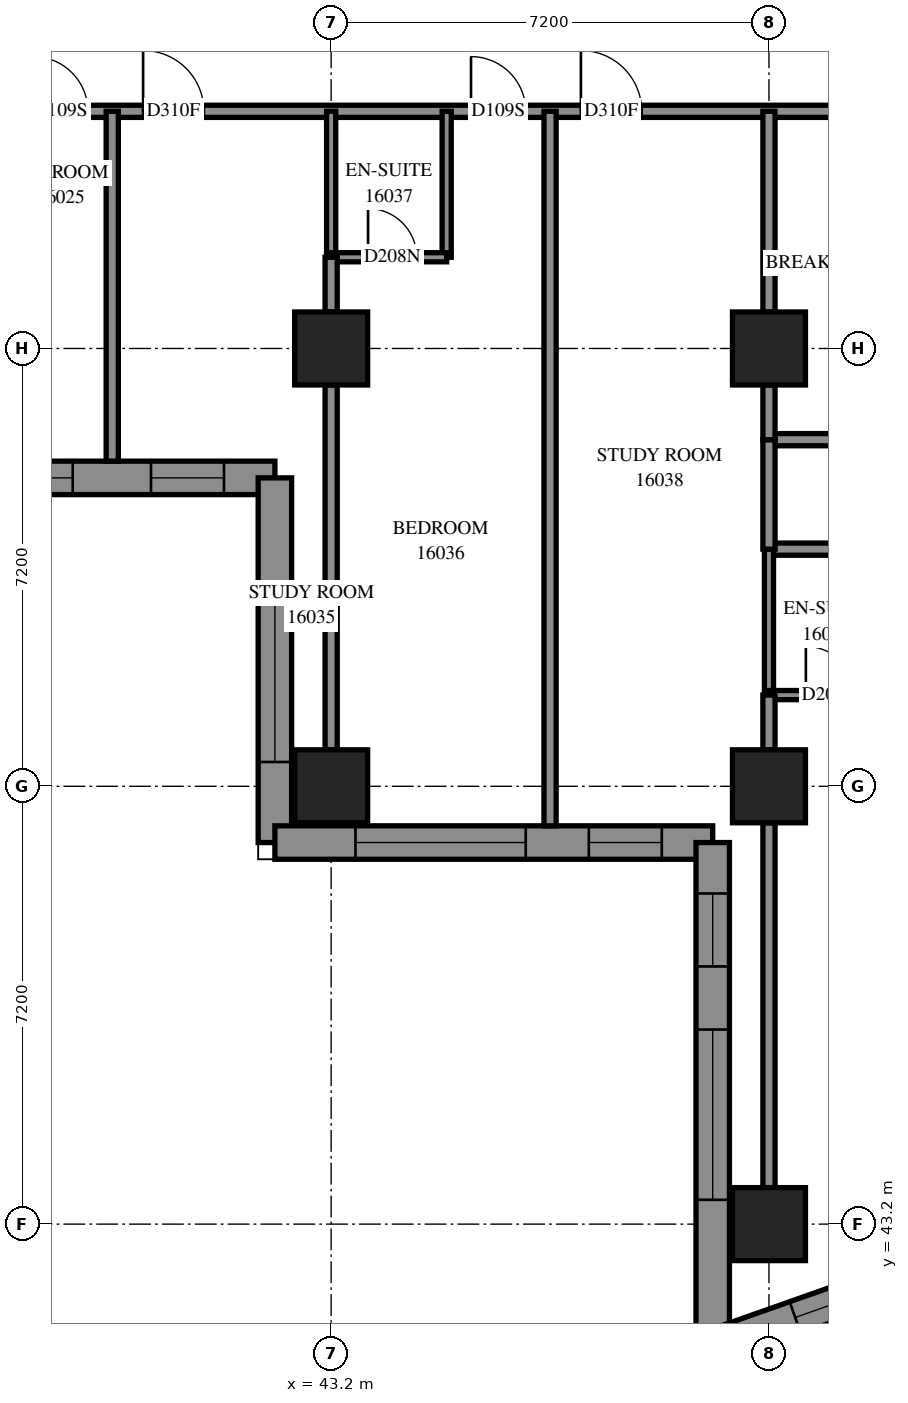
"""IFC4 building model, lengths in metres.
Left out: names, types, materials, properties, quantities, classifications, styles, units other than length and angle.
Written with IfcOpenShell. Run it as: python <this file> out.ifc"""

import sys

from ifc_helpers import new_model, si_unit, direction, frame, frame_2d, origin, origin_2d, place, context, subcontext, project, spatial, polyline, rectangle, outline, extrude, element, fill, save


model = new_model("IFC4")
c1 = context("Model", 3, precision=1e-05, world=origin(), true_north=direction((0.0, 1.0)))
c2 = subcontext(c1, "Body", "Model", "MODEL_VIEW")
j1 = project(units=[si_unit("LENGTHUNIT", "METRE"), si_unit("PLANEANGLEUNIT", "RADIAN")], contexts=[c1])
p1 = place(None, origin())
s1 = spatial("IfcSite", under=j1, at=p1, CompositionType="ELEMENT")
p2 = place(p1, origin())
s2 = spatial("IfcBuilding", under=s1, at=p2, CompositionType="ELEMENT")
p3 = place(p2, frame((0.0, 0.0, 61.0)))
s3 = spatial("IfcBuildingStorey", under=s2, at=p3, CompositionType="ELEMENT", Elevation=61.0)
for number, where, z_axis, x_axis in (
    (1, (43.2, 50.4, 0.0), (0.0, 0.0, 1.0), (1.0, 0.0, 0.0)),
    (2, (43.2, 57.6, 0.0), (0.0, 0.0, 1.0), (1.0, 0.0, 0.0)),
    (3, (50.4, 43.2, 0.0), (0.0, 0.0, 1.0), (1.0, 0.0, 0.0)),
    (4, (50.4, 50.4, 0.0), (0.0, 0.0, 1.0), (1.0, 0.0, 0.0)),
    (5, (50.4, 57.6, 0.0), (0.0, 0.0, 1.0), (1.0, 0.0, 0.0)),
):
    element("IfcColumn", number, at=place(p3, frame(where, z_axis=z_axis, x_axis=x_axis)), inside=s3, PredefinedType="COLUMN", context=c2, shape_type="SweptSolid", body=[
        extrude(rectangle(XDim=1.2, YDim=1.2, at=origin_2d()), origin(), (0.0, 0.0, 1.0), 3.1),
    ])
p4 = place(p3, frame((27.875, 55.472, 0.0), z_axis=(0.0, 0.0, 1.0), x_axis=(1.0, 0.0, 0.0)))
e6 = element("IfcWall", 6, at=p4, inside=s3, PredefinedType="SOLIDWALL", context=c2, shape_type="SweptSolid", body=[
    extrude(outline(polyline([(-0.275, -0.275), (14.125, -0.275), (14.675, 0.275), (0.275, 0.275), (-0.275, -0.275)])), origin(), (0.0, 0.0, 1.0), 3.1),
])
p5 = place(p4, frame((1.325, 0.0, 0.5)))
e7 = element("IfcOpeningElement", 7, at=p5, cuts=e6, PredefinedType="OPENING", context=c2, shape_type="SweptSolid", body=[
    extrude(rectangle(XDim=2.8, YDim=2.45, at=frame_2d((1.4, 1.225))), frame((0.0, 0.285, 0.0), z_axis=(0.0, -1.0, 0.0), x_axis=(1.0, 0.0, 0.0)), (0.0, 0.0, 1.0), 0.57),
])
p6 = place(p4, frame((4.925, 0.0, 0.5)))
e8 = element("IfcOpeningElement", 8, at=p6, cuts=e6, PredefinedType="OPENING", context=c2, shape_type="SweptSolid", body=[
    extrude(rectangle(XDim=2.8, YDim=2.45, at=frame_2d((1.4, 1.225))), frame((0.0, 0.285, 0.0), z_axis=(0.0, -1.0, 0.0), x_axis=(1.0, 0.0, 0.0)), (0.0, 0.0, 1.0), 0.57),
])
p7 = place(p4, frame((8.275, 0.0, 0.5)))
e9 = element("IfcOpeningElement", 9, at=p7, cuts=e6, PredefinedType="OPENING", context=c2, shape_type="SweptSolid", body=[
    extrude(rectangle(XDim=2.8, YDim=2.45, at=frame_2d((1.4, 1.225))), frame((0.0, 0.285, 0.0), z_axis=(0.0, -1.0, 0.0), x_axis=(1.0, 0.0, 0.0)), (0.0, 0.0, 1.0), 0.57),
])
p8 = place(p4, frame((12.363, 0.0, 0.5)))
e10 = element("IfcOpeningElement", 10, at=p8, cuts=e6, PredefinedType="OPENING", context=c2, shape_type="SweptSolid", body=[
    extrude(rectangle(XDim=1.2, YDim=2.45, at=frame_2d((0.6, 1.225))), frame((0.0, 0.285, 0.0), z_axis=(0.0, -1.0, 0.0), x_axis=(1.0, 0.0, 0.0)), (0.0, 0.0, 1.0), 0.57),
])
p9 = place(p3, frame((42.275, 55.472, 0.0), z_axis=(0.0, 0.0, 1.0), x_axis=(0.0, -1.0, 0.0)))
e11 = element("IfcWall", 11, at=p9, inside=s3, PredefinedType="SOLIDWALL", context=c2, shape_type="SweptSolid", body=[
    extrude(outline(polyline([(0.275, -0.275), (6.272, -0.275), (5.722, 0.275), (-0.275, 0.275), (0.275, -0.275)])), origin(), (0.0, 0.0, 1.0), 3.1),
])
p10 = place(p9, frame((1.872, 0.0, 0.5)))
e12 = element("IfcOpeningElement", 12, at=p10, cuts=e11, PredefinedType="OPENING", context=c2, shape_type="SweptSolid", body=[
    extrude(rectangle(XDim=2.8, YDim=2.45, at=frame_2d((1.4, 1.225))), frame((0.0, 0.285, 0.0), z_axis=(0.0, -1.0, 0.0), x_axis=(1.0, 0.0, 0.0)), (0.0, 0.0, 1.0), 0.57),
])
p11 = place(p3, frame((42.275, 49.475, 0.0), z_axis=(0.0, 0.0, 1.0), x_axis=(1.0, 0.0, 0.0)))
e13 = element("IfcWall", 13, at=p11, inside=s3, PredefinedType="SOLIDWALL", context=c2, shape_type="SweptSolid", body=[
    extrude(outline(polyline([(-0.275, -0.275), (6.925, -0.275), (7.475, 0.275), (0.275, 0.275), (-0.275, -0.275)])), origin(), (0.0, 0.0, 1.0), 3.1),
])
p12 = place(p11, frame((1.325, 0.0, 0.5)))
e14 = element("IfcOpeningElement", 14, at=p12, cuts=e13, PredefinedType="OPENING", context=c2, shape_type="SweptSolid", body=[
    extrude(rectangle(XDim=2.8, YDim=2.45, at=frame_2d((1.4, 1.225))), frame((0.0, 0.285, 0.0), z_axis=(0.0, -1.0, 0.0), x_axis=(1.0, 0.0, 0.0)), (0.0, 0.0, 1.0), 0.57),
])
p13 = place(p11, frame((5.162, 0.0, 0.5)))
e15 = element("IfcOpeningElement", 15, at=p13, cuts=e13, PredefinedType="OPENING", context=c2, shape_type="SweptSolid", body=[
    extrude(rectangle(XDim=1.2, YDim=2.45, at=frame_2d((0.6, 1.225))), frame((0.0, 0.285, 0.0), z_axis=(0.0, -1.0, 0.0), x_axis=(1.0, 0.0, 0.0)), (0.0, 0.0, 1.0), 0.57),
])
p14 = place(p3, frame((49.475, 49.475, 0.0), z_axis=(0.0, 0.0, 1.0), x_axis=(0.0, -1.0, 0.0)))
e16 = element("IfcWall", 16, at=p14, inside=s3, PredefinedType="SOLIDWALL", context=c2, shape_type="SweptSolid", body=[
    extrude(outline(polyline([(0.275, -0.275), (8.678, -0.275), (7.901, 0.275), (-0.275, 0.275), (0.275, -0.275)])), origin(), (0.0, 0.0, 1.0), 3.1),
])
p15 = place(p14, frame((3.075, 0.0, 0.5)))
e17 = element("IfcOpeningElement", 17, at=p15, cuts=e16, PredefinedType="OPENING", context=c2, shape_type="SweptSolid", body=[
    extrude(rectangle(XDim=2.8, YDim=2.45, at=frame_2d((1.4, 1.225))), frame((0.0, 0.285, 0.0), z_axis=(0.0, -1.0, 0.0), x_axis=(1.0, 0.0, 0.0)), (0.0, 0.0, 1.0), 0.57),
])
p16 = place(p14, frame((0.838, 0.0, 0.5)))
e18 = element("IfcOpeningElement", 18, at=p16, cuts=e16, PredefinedType="OPENING", context=c2, shape_type="SweptSolid", body=[
    extrude(rectangle(XDim=1.2, YDim=2.45, at=frame_2d((0.6, 1.225))), frame((0.0, 0.285, 0.0), z_axis=(0.0, -1.0, 0.0), x_axis=(1.0, 0.0, 0.0)), (0.0, 0.0, 1.0), 0.57),
])
p17 = place(p3, frame((49.475, 41.186, 0.0), z_axis=(0.0, 0.0, 1.0), x_axis=(0.9429483298, 0.3329391044, 0.0)))
e19 = element("IfcWall", 19, at=p17, inside=s3, PredefinedType="SOLIDWALL", context=c2, shape_type="SweptSolid", body=[
    extrude(outline(polyline([(-0.389, -0.275), (3.225, -0.275), (3.369, 0.275), (0.389, 0.275), (-0.389, -0.275)])), origin(), (0.0, 0.0, 1.0), 3.1),
])
p18 = place(p17, frame((1.439, 0.0, 0.5)))
e20 = element("IfcOpeningElement", 20, at=p18, cuts=e19, PredefinedType="OPENING", context=c2, shape_type="SweptSolid", body=[
    extrude(rectangle(XDim=1.2, YDim=2.45, at=frame_2d((0.6, 1.225))), frame((0.0, 0.285, 0.0), z_axis=(0.0, -1.0, 0.0), x_axis=(1.0, 0.0, 0.0)), (0.0, 0.0, 1.0), 0.57),
])
p19 = place(p3, frame((28.8, 61.5, 0.0), z_axis=(0.0, 0.0, 1.0), x_axis=(1.0, 0.0, 0.0)))
e21 = element("IfcWall", 21, at=p19, inside=s3, PredefinedType="PARTITIONING", context=c2, shape_type="SweptSolid", body=[
    extrude(rectangle(XDim=24.3, YDim=0.2, at=frame_2d((12.15, 0.0))), origin(), (0.0, 0.0, 1.0), 3.1),
])
p20 = place(p19, frame((3.899, 0.0, 0.0)))
e22 = element("IfcOpeningElement", 22, at=p20, cuts=e21, PredefinedType="OPENING", context=c2, shape_type="SweptSolid", body=[
    extrude(rectangle(XDim=0.9, YDim=2.1, at=frame_2d((0.45, 1.05))), frame((0.0, 0.11, 0.0), z_axis=(0.0, -1.0, 0.0), x_axis=(1.0, 0.0, 0.0)), (0.0, 0.0, 1.0), 0.22),
])
p21 = place(p19, frame((9.5, 0.0, 0.0)))
e23 = element("IfcOpeningElement", 23, at=p21, cuts=e21, PredefinedType="OPENING", context=c2, shape_type="SweptSolid", body=[
    extrude(rectangle(XDim=0.9, YDim=2.1, at=frame_2d((0.45, 1.05))), frame((0.0, 0.11, 0.0), z_axis=(0.0, -1.0, 0.0), x_axis=(1.0, 0.0, 0.0)), (0.0, 0.0, 1.0), 0.22),
])
p22 = place(p19, frame((11.307, 0.0, 0.0)))
e24 = element("IfcOpeningElement", 24, at=p22, cuts=e21, PredefinedType="OPENING", context=c2, shape_type="SweptSolid", body=[
    extrude(rectangle(XDim=1.0, YDim=2.1, at=frame_2d((0.5, 1.05))), frame((0.0, 0.11, 0.0), z_axis=(0.0, -1.0, 0.0), x_axis=(1.0, 0.0, 0.0)), (0.0, 0.0, 1.0), 0.22),
])
p23 = place(p19, frame((16.7, 0.0, 0.0)))
e25 = element("IfcOpeningElement", 25, at=p23, cuts=e21, PredefinedType="OPENING", context=c2, shape_type="SweptSolid", body=[
    extrude(rectangle(XDim=0.9, YDim=2.1, at=frame_2d((0.45, 1.05))), frame((0.0, 0.11, 0.0), z_axis=(0.0, -1.0, 0.0), x_axis=(1.0, 0.0, 0.0)), (0.0, 0.0, 1.0), 0.22),
])
p24 = place(p19, frame((18.508, 0.0, 0.0)))
e26 = element("IfcOpeningElement", 26, at=p24, cuts=e21, PredefinedType="OPENING", context=c2, shape_type="SweptSolid", body=[
    extrude(rectangle(XDim=1.0, YDim=2.1, at=frame_2d((0.5, 1.05))), frame((0.0, 0.11, 0.0), z_axis=(0.0, -1.0, 0.0), x_axis=(1.0, 0.0, 0.0)), (0.0, 0.0, 1.0), 0.22),
])
p25 = place(p19, frame((23.033, 0.0, 0.0)))
e27 = element("IfcOpeningElement", 27, at=p25, cuts=e21, PredefinedType="OPENING", context=c2, shape_type="SweptSolid", body=[
    extrude(rectangle(XDim=1.0, YDim=2.1, at=frame_2d((0.5, 1.05))), frame((0.0, 0.11, 0.0), z_axis=(0.0, -1.0, 0.0), x_axis=(1.0, 0.0, 0.0)), (0.0, 0.0, 1.0), 0.22),
])
p26 = place(p3, frame((46.8, 49.75, 0.0), z_axis=(0.0, 0.0, 1.0), x_axis=(0.0, 1.0, 0.0)))
e28 = element("IfcWall", 28, at=p26, inside=s3, PredefinedType="PARTITIONING", context=c2, shape_type="SweptSolid", body=[
    extrude(rectangle(XDim=11.75, YDim=0.2, at=frame_2d((5.875, 0.0))), origin(), (0.0, 0.0, 1.0), 3.1),
])
for number, where, z_axis, x_axis in (
    (29, (43.2, 51.0, 0.0), (0.0, 0.0, 1.0), (0.0, 1.0, 0.0)),
    (30, (50.4, 43.8, 0.0), (0.0, 0.0, 1.0), (0.0, 1.0, 0.0)),
):
    element("IfcWall", number, at=place(p3, frame(where, z_axis=z_axis, x_axis=x_axis)), inside=s3, PredefinedType="PARTITIONING", context=c2, shape_type="SweptSolid", body=[
        extrude(rectangle(XDim=6.0, YDim=0.2, at=frame_2d((3.0, 0.0))), origin(), (0.0, 0.0, 1.0), 2.6),
    ])
p27 = place(p3, frame((39.6, 55.747, 0.0), z_axis=(0.0, 0.0, 1.0), x_axis=(0.0, 1.0, 0.0)))
e31 = element("IfcWall", 31, at=p27, inside=s3, PredefinedType="PARTITIONING", context=c2, shape_type="SweptSolid", body=[
    extrude(rectangle(XDim=5.753, YDim=0.2, at=frame_2d((2.877, 0.0))), origin(), (0.0, 0.0, 1.0), 3.1),
])
p28 = place(p3, frame((50.4, 54.3, 0.0), z_axis=(0.0, 0.0, 1.0), x_axis=(1.0, 0.0, 0.0)))
e32 = element("IfcWall", 32, at=p28, inside=s3, PredefinedType="PARTITIONING", context=c2, shape_type="SweptSolid", body=[
    extrude(rectangle(XDim=4.7, YDim=0.2, at=frame_2d((2.35, 0.0))), origin(), (0.0, 0.0, 1.0), 3.1),
])
p29 = place(p28, frame((2.3, 0.0, 0.0)))
e33 = element("IfcOpeningElement", 33, at=p29, cuts=e32, PredefinedType="OPENING", context=c2, shape_type="SweptSolid", body=[
    extrude(rectangle(XDim=0.9, YDim=2.1, at=frame_2d((0.45, 1.05))), frame((0.0, 0.11, 0.0), z_axis=(0.0, -1.0, 0.0), x_axis=(1.0, 0.0, 0.0)), (0.0, 0.0, 1.0), 0.22),
])
p30 = place(p3, frame((50.4, 58.2, 0.0), z_axis=(0.0, 0.0, 1.0), x_axis=(0.0, 1.0, 0.0)))
e34 = element("IfcWall", 34, at=p30, inside=s3, PredefinedType="PARTITIONING", context=c2, shape_type="SweptSolid", body=[
    extrude(rectangle(XDim=3.3, YDim=0.2, at=frame_2d((1.65, 0.0))), origin(), (0.0, 0.0, 1.0), 3.1),
])
p31 = place(p3, frame((50.4, 56.1, 0.0), z_axis=(0.0, 0.0, 1.0), x_axis=(1.0, 0.0, 0.0)))
e35 = element("IfcWall", 35, at=p31, inside=s3, PredefinedType="PARTITIONING", context=c2, shape_type="SweptSolid", body=[
    extrude(rectangle(XDim=2.7, YDim=0.2, at=frame_2d((1.35, 0.0))), origin(), (0.0, 0.0, 1.0), 3.1),
])
for number, where, z_axis, x_axis in (
    (36, (45.1, 59.1, 0.0), (0.0, 0.0, 1.0), (0.0, 1.0, 0.0)),
    (37, (43.2, 59.1, 0.0), (0.0, 0.0, 1.0), (0.0, 1.0, 0.0)),
    (38, (50.4, 51.9, 0.0), (0.0, 0.0, 1.0), (0.0, 1.0, 0.0)),
):
    element("IfcWall", number, at=place(p3, frame(where, z_axis=z_axis, x_axis=x_axis)), inside=s3, PredefinedType="PARTITIONING", context=c2, shape_type="SweptSolid", body=[
        extrude(rectangle(XDim=2.4, YDim=0.15, at=frame_2d((1.2, 0.0))), origin(), (0.0, 0.0, 1.0), 3.1),
    ])
p32 = place(p3, frame((43.2, 59.1, 0.0), z_axis=(0.0, 0.0, 1.0), x_axis=(1.0, 0.0, 0.0)))
e39 = element("IfcWall", 39, at=p32, inside=s3, PredefinedType="PARTITIONING", context=c2, shape_type="SweptSolid", body=[
    extrude(rectangle(XDim=1.9, YDim=0.15, at=frame_2d((0.95, 0.0))), origin(), (0.0, 0.0, 1.0), 3.1),
])
p33 = place(p32, frame((0.607, 0.0, 0.0)))
e40 = element("IfcOpeningElement", 40, at=p33, cuts=e39, PredefinedType="OPENING", context=c2, shape_type="SweptSolid", body=[
    extrude(rectangle(XDim=0.8, YDim=2.1, at=frame_2d((0.4, 1.05))), frame((0.0, 0.085, 0.0), z_axis=(0.0, -1.0, 0.0), x_axis=(1.0, 0.0, 0.0)), (0.0, 0.0, 1.0), 0.17),
])
p34 = place(p3, frame((50.4, 51.9, 0.0), z_axis=(0.0, 0.0, 1.0), x_axis=(1.0, 0.0, 0.0)))
e41 = element("IfcWall", 41, at=p34, inside=s3, PredefinedType="PARTITIONING", context=c2, shape_type="SweptSolid", body=[
    extrude(rectangle(XDim=1.9, YDim=0.15, at=frame_2d((0.95, 0.0))), origin(), (0.0, 0.0, 1.0), 3.1),
])
p35 = place(p34, frame((0.607, 0.0, 0.0)))
e42 = element("IfcOpeningElement", 42, at=p35, cuts=e41, PredefinedType="OPENING", context=c2, shape_type="SweptSolid", body=[
    extrude(rectangle(XDim=0.8, YDim=2.1, at=frame_2d((0.4, 1.05))), frame((0.0, 0.085, 0.0), z_axis=(0.0, -1.0, 0.0), x_axis=(1.0, 0.0, 0.0)), (0.0, 0.0, 1.0), 0.17),
])
p36 = place(p3, frame((50.4, 54.3, 0.0), z_axis=(0.0, 0.0, 1.0), x_axis=(0.0, 1.0, 0.0)))
e43 = element("IfcWall", 43, at=p36, inside=s3, PredefinedType="PARTITIONING", context=c2, shape_type="SweptSolid", body=[
    extrude(rectangle(XDim=1.8, YDim=0.2, at=frame_2d((0.9, 0.0))), origin(), (0.0, 0.0, 1.0), 3.1),
])
for number, where, z_axis, x_axis in (
    (44, (43.2, 58.2, 0.0), (0.0, 0.0, 1.0), (0.0, 1.0, 0.0)),
    (45, (50.4, 51.0, 0.0), (0.0, 0.0, 1.0), (0.0, 1.0, 0.0)),
    (46, (50.4, 56.1, 0.0), (0.0, 0.0, 1.0), (0.0, 1.0, 0.0)),
):
    element("IfcWall", number, at=place(p3, frame(where, z_axis=z_axis, x_axis=x_axis)), inside=s3, PredefinedType="PARTITIONING", context=c2, shape_type="SweptSolid", body=[
        extrude(rectangle(XDim=0.9, YDim=0.2, at=frame_2d((0.45, 0.0))), origin(), (0.0, 0.0, 1.0), 3.1),
    ])
p37 = place(p7, origin())
e47 = element("IfcWindow", 47, at=p37, inside=s3, PartitioningType="SINGLE_PANEL", PredefinedType="WINDOW", context=c2, shape_type="SweptSolid", body=[
    extrude(rectangle(XDim=2.8, YDim=2.45, at=frame_2d((1.4, 1.225))), frame((0.0, 0.155, 0.0), z_axis=(0.0, -1.0, 0.0), x_axis=(1.0, 0.0, 0.0)), (0.0, 0.0, 1.0), 0.06),
])
fill(e9, e47)
p38 = place(p8, origin())
e48 = element("IfcWindow", 48, at=p38, inside=s3, PartitioningType="SINGLE_PANEL", PredefinedType="WINDOW", context=c2, shape_type="SweptSolid", body=[
    extrude(rectangle(XDim=1.2, YDim=2.45, at=frame_2d((0.6, 1.225))), frame((0.0, 0.155, 0.0), z_axis=(0.0, -1.0, 0.0), x_axis=(1.0, 0.0, 0.0)), (0.0, 0.0, 1.0), 0.06),
])
fill(e10, e48)
p39 = place(p10, origin())
e49 = element("IfcWindow", 49, at=p39, inside=s3, PartitioningType="SINGLE_PANEL", PredefinedType="WINDOW", context=c2, shape_type="SweptSolid", body=[
    extrude(rectangle(XDim=2.8, YDim=2.45, at=frame_2d((1.4, 1.225))), frame((0.0, 0.155, 0.0), z_axis=(0.0, -1.0, 0.0), x_axis=(1.0, 0.0, 0.0)), (0.0, 0.0, 1.0), 0.06),
])
fill(e12, e49)
p40 = place(p12, origin())
e50 = element("IfcWindow", 50, at=p40, inside=s3, PartitioningType="SINGLE_PANEL", PredefinedType="WINDOW", context=c2, shape_type="SweptSolid", body=[
    extrude(rectangle(XDim=2.8, YDim=2.45, at=frame_2d((1.4, 1.225))), frame((0.0, 0.155, 0.0), z_axis=(0.0, -1.0, 0.0), x_axis=(1.0, 0.0, 0.0)), (0.0, 0.0, 1.0), 0.06),
])
fill(e14, e50)
p41 = place(p13, origin())
e51 = element("IfcWindow", 51, at=p41, inside=s3, PartitioningType="SINGLE_PANEL", PredefinedType="WINDOW", context=c2, shape_type="SweptSolid", body=[
    extrude(rectangle(XDim=1.2, YDim=2.45, at=frame_2d((0.6, 1.225))), frame((0.0, 0.155, 0.0), z_axis=(0.0, -1.0, 0.0), x_axis=(1.0, 0.0, 0.0)), (0.0, 0.0, 1.0), 0.06),
])
fill(e15, e51)
p42 = place(p15, origin())
e52 = element("IfcWindow", 52, at=p42, inside=s3, PartitioningType="SINGLE_PANEL", PredefinedType="WINDOW", context=c2, shape_type="SweptSolid", body=[
    extrude(rectangle(XDim=2.8, YDim=2.45, at=frame_2d((1.4, 1.225))), frame((0.0, 0.155, 0.0), z_axis=(0.0, -1.0, 0.0), x_axis=(1.0, 0.0, 0.0)), (0.0, 0.0, 1.0), 0.06),
])
fill(e17, e52)
p43 = place(p16, origin())
e53 = element("IfcWindow", 53, at=p43, inside=s3, PartitioningType="SINGLE_PANEL", PredefinedType="WINDOW", context=c2, shape_type="SweptSolid", body=[
    extrude(rectangle(XDim=1.2, YDim=2.45, at=frame_2d((0.6, 1.225))), frame((0.0, 0.155, 0.0), z_axis=(0.0, -1.0, 0.0), x_axis=(1.0, 0.0, 0.0)), (0.0, 0.0, 1.0), 0.06),
])
fill(e18, e53)
p44 = place(p18, origin())
e54 = element("IfcWindow", 54, at=p44, inside=s3, PartitioningType="SINGLE_PANEL", PredefinedType="WINDOW", context=c2, shape_type="SweptSolid", body=[
    extrude(rectangle(XDim=1.2, YDim=2.45, at=frame_2d((0.6, 1.225))), frame((0.0, 0.155, 0.0), z_axis=(0.0, -1.0, 0.0), x_axis=(1.0, 0.0, 0.0)), (0.0, 0.0, 1.0), 0.06),
])
fill(e20, e54)
p45 = place(p21, origin())
e55 = element("IfcDoor", 55, at=p45, inside=s3, OperationType="SINGLE_SWING_LEFT", PredefinedType="DOOR", context=c2, shape_type="SweptSolid", body=[
    extrude(rectangle(XDim=0.9, YDim=2.1, at=frame_2d((0.45, 1.05))), frame((0.0, 0.025, 0.0), z_axis=(0.0, -1.0, 0.0), x_axis=(1.0, 0.0, 0.0)), (0.0, 0.0, 1.0), 0.05),
])
fill(e23, e55)
p46 = place(p22, origin())
e56 = element("IfcDoor", 56, at=p46, inside=s3, OperationType="SINGLE_SWING_RIGHT", PredefinedType="DOOR", context=c2, shape_type="SweptSolid", body=[
    extrude(rectangle(XDim=1.0, YDim=2.1, at=frame_2d((0.5, 1.05))), frame((0.0, 0.025, 0.0), z_axis=(0.0, -1.0, 0.0), x_axis=(1.0, 0.0, 0.0)), (0.0, 0.0, 1.0), 0.05),
])
fill(e24, e56)
p47 = place(p23, origin())
e57 = element("IfcDoor", 57, at=p47, inside=s3, OperationType="SINGLE_SWING_LEFT", PredefinedType="DOOR", context=c2, shape_type="SweptSolid", body=[
    extrude(rectangle(XDim=0.9, YDim=2.1, at=frame_2d((0.45, 1.05))), frame((0.0, 0.025, 0.0), z_axis=(0.0, -1.0, 0.0), x_axis=(1.0, 0.0, 0.0)), (0.0, 0.0, 1.0), 0.05),
])
fill(e25, e57)
p48 = place(p33, origin())
e58 = element("IfcDoor", 58, at=p48, inside=s3, OperationType="SINGLE_SWING_RIGHT", PredefinedType="DOOR", context=c2, shape_type="SweptSolid", body=[
    extrude(rectangle(XDim=0.8, YDim=2.1, at=frame_2d((0.4, 1.05))), frame((0.0, 0.025, 0.0), z_axis=(0.0, -1.0, 0.0), x_axis=(1.0, 0.0, 0.0)), (0.0, 0.0, 1.0), 0.05),
])
fill(e40, e58)
p49 = place(p24, origin())
e59 = element("IfcDoor", 59, at=p49, inside=s3, OperationType="SINGLE_SWING_RIGHT", PredefinedType="DOOR", context=c2, shape_type="SweptSolid", body=[
    extrude(rectangle(XDim=1.0, YDim=2.1, at=frame_2d((0.5, 1.05))), frame((0.0, 0.025, 0.0), z_axis=(0.0, -1.0, 0.0), x_axis=(1.0, 0.0, 0.0)), (0.0, 0.0, 1.0), 0.05),
])
fill(e26, e59)
p50 = place(p35, origin())
e60 = element("IfcDoor", 60, at=p50, inside=s3, OperationType="SINGLE_SWING_RIGHT", PredefinedType="DOOR", context=c2, shape_type="SweptSolid", body=[
    extrude(rectangle(XDim=0.8, YDim=2.1, at=frame_2d((0.4, 1.05))), frame((0.0, 0.025, 0.0), z_axis=(0.0, -1.0, 0.0), x_axis=(1.0, 0.0, 0.0)), (0.0, 0.0, 1.0), 0.05),
])
fill(e42, e60)
save(model, sys.argv[1])
